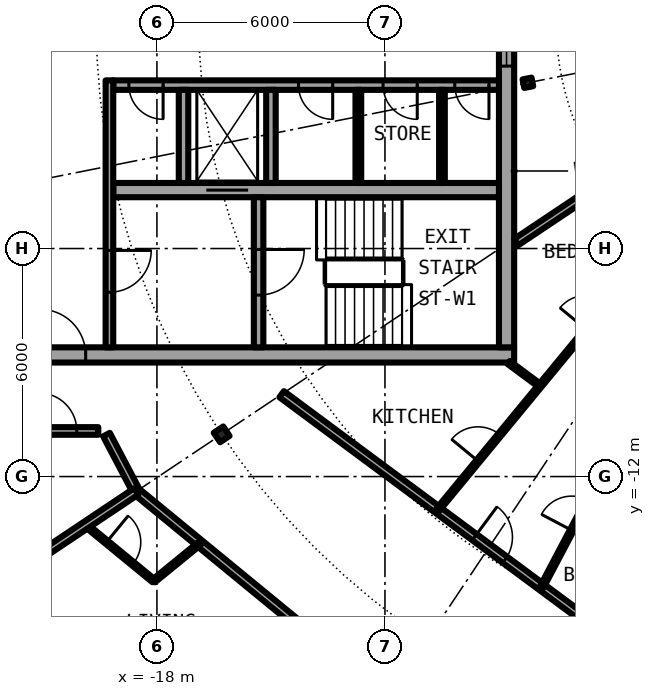
"""IFC4 building model, lengths in metres.
Left out: names, types, materials, properties, quantities, classifications, styles, units other than length and angle.
Written with IfcOpenShell. Run it as: python <this file> out.ifc"""

import sys

from ifc_helpers import new_model, si_unit, direction, frame, frame_2d, origin, origin_2d, place, context, subcontext, project, spatial, rectangle, i_section, extrude, element, fill, save


model = new_model("IFC4")
c1 = context("Model", 3, precision=1e-05, world=origin(), true_north=direction((0.0, 1.0)))
c2 = subcontext(c1, "Body", "Model", "MODEL_VIEW")
j1 = project(units=[si_unit("LENGTHUNIT", "METRE"), si_unit("PLANEANGLEUNIT", "RADIAN")], contexts=[c1])
p1 = place(None, origin())
s1 = spatial("IfcSite", under=j1, at=p1, CompositionType="ELEMENT")
p2 = place(p1, origin())
s2 = spatial("IfcBuilding", under=s1, at=p2, CompositionType="ELEMENT")
p3 = place(p2, frame((0.0, 0.0, 227.95)))
s3 = spatial("IfcBuildingStorey", under=s2, at=p3, CompositionType="ELEMENT", Elevation=227.95)
p4 = place(p3, frame((-16.297, -10.889, 0.0), z_axis=(0.0, 0.0, 1.0), x_axis=(-0.831469612303, -0.55557023302, 0.0)))
e1 = element("IfcColumn", 1, at=p4, inside=s3, PredefinedType="COLUMN", context=c2, shape_type="SweptSolid", body=[
    extrude(i_section(OverallWidth=0.3, OverallDepth=0.3, WebThickness=0.011, FlangeThickness=0.019, FilletRadius=0.027, at=origin_2d()), origin(), (0.0, 0.0, 1.0), 3.05),
])
p5 = place(p3, frame((-8.239, -1.639, 0.0), z_axis=(0.0, 0.0, 1.0), x_axis=(-0.980785280403, -0.195090322016, 0.0)))
e2 = element("IfcColumn", 2, at=p5, inside=s3, PredefinedType="COLUMN", context=c2, shape_type="SweptSolid", body=[
    extrude(i_section(OverallWidth=0.24, OverallDepth=0.23, WebThickness=0.008, FlangeThickness=0.012, FilletRadius=0.021, at=origin_2d()), origin(), (0.0, 0.0, 1.0), 3.05),
])
p6 = place(p3, frame((-22.699, -15.167, 0.0), z_axis=(0.0, 0.0, 1.0), x_axis=(0.634382322723, -0.773019449054, 0.0)))
e3 = element("IfcWall", 3, at=p6, inside=s3, PredefinedType="SOLIDWALL", context=c2, shape_type="SweptSolid", body=[
    extrude(rectangle(XDim=5.352, YDim=0.25, at=frame_2d((2.676, 0.0))), origin(), (0.0, 0.0, 1.0), 2.7),
])
p7 = place(p6, frame((0.841, 0.0, 0.0)))
e4 = element("IfcOpeningElement", 4, at=p7, cuts=e3, PredefinedType="OPENING", context=c2, shape_type="SweptSolid", body=[
    extrude(rectangle(XDim=1.0, YDim=2.2, at=frame_2d((0.5, 1.1))), frame((0.0, 0.135, 0.0), z_axis=(0.0, -1.0, 0.0), x_axis=(1.0, 0.0, 0.0)), (0.0, 0.0, 1.0), 0.27),
])
p8 = place(p6, frame((3.111, 0.0, 0.3)))
e5 = element("IfcOpeningElement", 5, at=p8, cuts=e3, PredefinedType="OPENING", context=c2, shape_type="SweptSolid", body=[
    extrude(rectangle(XDim=1.8, YDim=2.1, at=frame_2d((0.9, 1.05))), frame((0.0, 0.135, 0.0), z_axis=(0.0, -1.0, 0.0), x_axis=(1.0, 0.0, 0.0)), (0.0, 0.0, 1.0), 0.27),
])
p9 = place(p3, frame((-22.0, -8.8, 0.0), z_axis=(0.0, 0.0, 1.0), x_axis=(1.0, 0.0, 0.0)))
e6 = element("IfcWall", 6, at=p9, inside=s3, PredefinedType="SHEAR", context=c2, shape_type="SweptSolid", body=[
    extrude(rectangle(XDim=13.4, YDim=0.4, at=frame_2d((6.7, 0.0))), origin(), (0.0, 0.0, 1.0), 3.05),
])
p10 = place(p9, frame((0.925, 0.0, 0.0)))
e7 = element("IfcOpeningElement", 7, at=p10, cuts=e6, PredefinedType="OPENING", context=c2, shape_type="SweptSolid", body=[
    extrude(rectangle(XDim=1.2, YDim=2.3, at=frame_2d((0.6, 1.15))), frame((0.0, 0.21, 0.0), z_axis=(0.0, -1.0, 0.0), x_axis=(1.0, 0.0, 0.0)), (0.0, 0.0, 1.0), 0.42),
])
p11 = place(p3, frame((-8.8, 8.6, 0.0), z_axis=(0.0, 0.0, 1.0), x_axis=(0.0, -1.0, 0.0)))
e8 = element("IfcWall", 8, at=p11, inside=s3, PredefinedType="SHEAR", context=c2, shape_type="SweptSolid", body=[
    extrude(rectangle(XDim=17.2, YDim=0.4, at=frame_2d((8.6, 0.0))), origin(), (0.0, 0.0, 1.0), 3.05),
])
p12 = place(p11, frame((7.4, 0.0, 0.1)))
e9 = element("IfcOpeningElement", 9, at=p12, cuts=e8, PredefinedType="OPENING", context=c2, shape_type="SweptSolid", body=[
    extrude(rectangle(XDim=2.4, YDim=2.2, at=frame_2d((1.2, 1.1))), frame((0.0, 0.21, 0.0), z_axis=(0.0, -1.0, 0.0), x_axis=(1.0, 0.0, 0.0)), (0.0, 0.0, 1.0), 0.42),
])
p13 = place(p3, frame((-9.0, -1.7, 0.0), z_axis=(0.0, 0.0, 1.0), x_axis=(-1.0, 0.0, 0.0)))
e10 = element("IfcWall", 10, at=p13, inside=s3, PredefinedType="SHEAR", context=c2, shape_type="SweptSolid", body=[
    extrude(rectangle(XDim=10.15, YDim=0.25, at=frame_2d((5.075, 0.0))), origin(), (0.0, 0.0, 1.0), 3.05),
])
p14 = place(p13, frame((0.262, 0.0, 0.0)))
e11 = element("IfcOpeningElement", 11, at=p14, cuts=e10, PredefinedType="OPENING", context=c2, shape_type="SweptSolid", body=[
    extrude(rectangle(XDim=0.9, YDim=2.3, at=frame_2d((0.45, 1.15))), frame((0.0, 0.135, 0.0), z_axis=(0.0, -1.0, 0.0), x_axis=(1.0, 0.0, 0.0)), (0.0, 0.0, 1.0), 0.27),
])
p15 = place(p13, frame((2.15, 0.0, 0.0)))
e12 = element("IfcOpeningElement", 12, at=p15, cuts=e10, PredefinedType="OPENING", context=c2, shape_type="SweptSolid", body=[
    extrude(rectangle(XDim=0.9, YDim=2.3, at=frame_2d((0.45, 1.15))), frame((0.0, 0.135, 0.0), z_axis=(0.0, -1.0, 0.0), x_axis=(1.0, 0.0, 0.0)), (0.0, 0.0, 1.0), 0.27),
])
p16 = place(p13, frame((4.375, 0.0, 0.0)))
e13 = element("IfcOpeningElement", 13, at=p16, cuts=e10, PredefinedType="OPENING", context=c2, shape_type="SweptSolid", body=[
    extrude(rectangle(XDim=0.9, YDim=2.3, at=frame_2d((0.45, 1.15))), frame((0.0, 0.135, 0.0), z_axis=(0.0, -1.0, 0.0), x_axis=(1.0, 0.0, 0.0)), (0.0, 0.0, 1.0), 0.27),
])
p17 = place(p13, frame((8.837, 0.0, 0.0)))
e14 = element("IfcOpeningElement", 14, at=p17, cuts=e10, PredefinedType="OPENING", context=c2, shape_type="SweptSolid", body=[
    extrude(rectangle(XDim=0.9, YDim=2.3, at=frame_2d((0.45, 1.15))), frame((0.0, 0.135, 0.0), z_axis=(0.0, -1.0, 0.0), x_axis=(1.0, 0.0, 0.0)), (0.0, 0.0, 1.0), 0.27),
])
p18 = place(p3, frame((-9.0, -4.462, 0.0), z_axis=(0.0, 0.0, 1.0), x_axis=(-1.0, 0.0, 0.0)))
e15 = element("IfcWall", 15, at=p18, inside=s3, PredefinedType="SHEAR", context=c2, shape_type="SweptSolid", body=[
    extrude(rectangle(XDim=10.15, YDim=0.375, at=frame_2d((5.075, 0.0))), origin(), (0.0, 0.0, 1.0), 3.05),
])
p19 = place(p18, frame((6.6, 0.0, 0.0)))
e16 = element("IfcOpeningElement", 16, at=p19, cuts=e15, PredefinedType="OPENING", context=c2, shape_type="SweptSolid", body=[
    extrude(rectangle(XDim=1.1, YDim=2.3, at=frame_2d((0.55, 1.15))), frame((0.0, 0.198, 0.0), z_axis=(0.0, -1.0, 0.0), x_axis=(1.0, 0.0, 0.0)), (0.0, 0.0, 1.0), 0.395),
])
p20 = place(p3, frame((-15.325, -4.65, 0.0), z_axis=(0.0, 0.0, 1.0), x_axis=(0.0, -1.0, 0.0)))
e17 = element("IfcWall", 17, at=p20, inside=s3, PredefinedType="SHEAR", context=c2, shape_type="SweptSolid", body=[
    extrude(rectangle(XDim=3.95, YDim=0.25, at=frame_2d((1.975, 0.0))), origin(), (0.0, 0.0, 1.0), 3.05),
])
p21 = place(p20, frame((1.375, 0.0, 0.0)))
e18 = element("IfcOpeningElement", 18, at=p21, cuts=e17, PredefinedType="OPENING", context=c2, shape_type="SweptSolid", body=[
    extrude(rectangle(XDim=1.2, YDim=2.3, at=frame_2d((0.6, 1.15))), frame((0.0, 0.135, 0.0), z_axis=(0.0, -1.0, 0.0), x_axis=(1.0, 0.0, 0.0)), (0.0, 0.0, 1.0), 0.27),
])
for number, where, z_axis, x_axis in (
    (19, (-15.0, -1.825, 0.0), (0.0, 0.0, 1.0), (0.0, -1.0, 0.0)),
    (20, (-17.3, -1.825, 0.0), (0.0, 0.0, 1.0), (0.0, -1.0, 0.0)),
):
    element("IfcWall", number, at=place(p3, frame(where, z_axis=z_axis, x_axis=x_axis)), inside=s3, PredefinedType="SOLIDWALL", context=c2, shape_type="SweptSolid", body=[
        extrude(rectangle(XDim=2.45, YDim=0.25, at=frame_2d((1.225, 0.0))), origin(), (0.0, 0.0, 1.0), 2.7),
    ])
p22 = place(p3, frame((-19.25, -1.575, 0.0), z_axis=(0.0, 0.0, 1.0), x_axis=(0.0, -1.0, 0.0)))
e21 = element("IfcWall", 21, at=p22, inside=s3, PredefinedType="SOLIDWALL", context=c2, shape_type="SweptSolid", body=[
    extrude(rectangle(XDim=7.025, YDim=0.2, at=frame_2d((3.513, 0.0))), origin(), (0.0, 0.0, 1.0), 2.7),
])
p23 = place(p22, frame((4.475, 0.0, 0.0)))
e22 = element("IfcOpeningElement", 22, at=p23, cuts=e21, PredefinedType="OPENING", context=c2, shape_type="SweptSolid", body=[
    extrude(rectangle(XDim=1.1, YDim=2.3, at=frame_2d((0.55, 1.15))), frame((0.0, 0.11, 0.0), z_axis=(0.0, -1.0, 0.0), x_axis=(1.0, 0.0, 0.0)), (0.0, 0.0, 1.0), 0.22),
])
for number, where, z_axis, x_axis in (
    (23, (-10.5, -1.825, 0.0), (0.0, 0.0, 1.0), (0.0, -1.0, 0.0)),
    (24, (-12.7, -1.825, 0.0), (0.0, 0.0, 1.0), (0.0, -1.0, 0.0)),
):
    element("IfcWall", number, at=place(p3, frame(where, z_axis=z_axis, x_axis=x_axis)), inside=s3, PredefinedType="PARTITIONING", context=c2, shape_type="SweptSolid", body=[
        extrude(rectangle(XDim=2.45, YDim=0.15, at=frame_2d((1.225, 0.0))), origin(), (0.0, 0.0, 1.0), 2.7),
    ])
p24 = place(p3, frame((-19.875, -13.274, 0.0), z_axis=(0.0, 0.0, 1.0), x_axis=(0.77288890179, -0.634541366256, 0.0)))
e25 = element("IfcWall", 25, at=p24, inside=s3, PredefinedType="PARTITIONING", context=c2, shape_type="SweptSolid", body=[
    extrude(rectangle(XDim=2.313, YDim=0.1, at=frame_2d((1.157, 0.0))), origin(), (0.0, 0.0, 1.0), 2.7),
])
p25 = place(p24, frame((0.711, 0.0, 0.0)))
e26 = element("IfcOpeningElement", 26, at=p25, cuts=e25, PredefinedType="OPENING", context=c2, shape_type="SweptSolid", body=[
    extrude(rectangle(XDim=0.9, YDim=2.3, at=frame_2d((0.45, 1.15))), frame((0.0, 0.06, 0.0), z_axis=(0.0, -1.0, 0.0), x_axis=(1.0, 0.0, 0.0)), (0.0, 0.0, 1.0), 0.12),
])
p26 = place(p3, frame((-19.328, -10.896, 0.0), z_axis=(0.0, 0.0, 1.0), x_axis=(0.465812036273, -0.88488369115, 0.0)))
e27 = element("IfcWall", 27, at=p26, inside=s3, PredefinedType="PARTITIONING", context=c2, shape_type="SweptSolid", body=[
    extrude(rectangle(XDim=1.687, YDim=0.2, at=frame_2d((0.844, 0.0))), origin(), (0.0, 0.0, 1.0), 2.7),
])
p27 = place(p3, frame((-18.542, -12.389, 0.0), z_axis=(0.0, 0.0, 1.0), x_axis=(0.772983503654, -0.634426121056, 0.0)))
e28 = element("IfcWall", 28, at=p27, inside=s3, PredefinedType="PARTITIONING", context=c2, shape_type="SweptSolid", body=[
    extrude(rectangle(XDim=12.947, YDim=0.2, at=frame_2d((6.474, 0.0))), origin(), (0.0, 0.0, 1.0), 2.7),
])
p28 = place(p27, frame((7.053, 0.0, 0.0)))
e29 = element("IfcOpeningElement", 29, at=p28, cuts=e28, PredefinedType="OPENING", context=c2, shape_type="SweptSolid", body=[
    extrude(rectangle(XDim=1.0, YDim=2.3, at=frame_2d((0.5, 1.15))), frame((0.0, 0.11, 0.0), z_axis=(0.0, -1.0, 0.0), x_axis=(1.0, 0.0, 0.0)), (0.0, 0.0, 1.0), 0.22),
])
p29 = place(p3, frame((-14.718, -9.833, 0.0), z_axis=(0.0, 0.0, 1.0), x_axis=(0.803240181354, -0.595655278712, 0.0)))
e30 = element("IfcWall", 30, at=p29, inside=s3, PredefinedType="PARTITIONING", context=c2, shape_type="SweptSolid", body=[
    extrude(rectangle(XDim=11.928, YDim=0.2, at=frame_2d((5.964, 0.0))), origin(), (0.0, 0.0, 1.0), 2.7),
])
p30 = place(p29, frame((6.316, 0.0, 0.0)))
e31 = element("IfcOpeningElement", 31, at=p30, cuts=e30, PredefinedType="OPENING", context=c2, shape_type="SweptSolid", body=[
    extrude(rectangle(XDim=1.0, YDim=2.3, at=frame_2d((0.5, 1.15))), frame((0.0, 0.11, 0.0), z_axis=(0.0, -1.0, 0.0), x_axis=(1.0, 0.0, 0.0)), (0.0, 0.0, 1.0), 0.22),
])
p31 = place(p3, frame((-8.743, -9.0, 0.0), z_axis=(0.0, 0.0, 1.0), x_axis=(0.80321556998, -0.595688465677, 0.0)))
e32 = element("IfcWall", 32, at=p31, inside=s3, PredefinedType="PARTITIONING", context=c2, shape_type="SweptSolid", body=[
    extrude(rectangle(XDim=1.026, YDim=0.1, at=frame_2d((0.513, 0.0))), origin(), (0.0, 0.0, 1.0), 2.7),
])
p32 = place(p3, frame((-21.675, -10.8, 0.0), z_axis=(0.0, 0.0, 1.0), x_axis=(1.0, 0.0, 0.0)))
e33 = element("IfcWall", 33, at=p32, inside=s3, PredefinedType="PARTITIONING", context=c2, shape_type="SweptSolid", body=[
    extrude(rectangle(XDim=2.132, YDim=0.2, at=frame_2d((1.066, 0.0))), origin(), (0.0, 0.0, 1.0), 2.7),
])
p33 = place(p32, frame((0.566, 0.0, 0.0)))
e34 = element("IfcOpeningElement", 34, at=p33, cuts=e33, PredefinedType="OPENING", context=c2, shape_type="SweptSolid", body=[
    extrude(rectangle(XDim=1.0, YDim=2.3, at=frame_2d((0.5, 1.15))), frame((0.0, 0.11, 0.0), z_axis=(0.0, -1.0, 0.0), x_axis=(1.0, 0.0, 0.0)), (0.0, 0.0, 1.0), 0.22),
])
p34 = place(p3, frame((-6.513, -4.472, 0.0), z_axis=(0.0, 0.0, 1.0), x_axis=(-0.831450132577, -0.555599385382, 0.0)))
e35 = element("IfcWall", 35, at=p34, inside=s3, PredefinedType="PARTITIONING", context=c2, shape_type="SweptSolid", body=[
    extrude(rectangle(XDim=2.443, YDim=0.2, at=frame_2d((1.221, 0.0))), origin(), (0.0, 0.0, 1.0), 2.7),
])
p35 = place(p3, frame((-22.595, -15.098, 0.0), z_axis=(0.0, 0.0, 1.0), x_axis=(0.831387096605, 0.55569370664, 0.0)))
e36 = element("IfcWall", 36, at=p35, inside=s3, PredefinedType="PARTITIONING", context=c2, shape_type="SweptSolid", body=[
    extrude(rectangle(XDim=4.875, YDim=0.2, at=frame_2d((2.438, 0.0))), origin(), (0.0, 0.0, 1.0), 2.7),
])
p36 = place(p3, frame((-18.084, -14.745, 0.0), z_axis=(0.0, 0.0, 1.0), x_axis=(0.774869051393, 0.632121786679, 0.0)))
e37 = element("IfcWall", 37, at=p36, inside=s3, PredefinedType="PARTITIONING", context=c2, shape_type="SweptSolid", body=[
    extrude(rectangle(XDim=1.562, YDim=0.1, at=frame_2d((0.781, 0.0))), origin(), (0.0, 0.0, 1.0), 2.7),
])
p37 = place(p3, frame((-10.612, -12.878, 0.0), z_axis=(0.0, 0.0, 1.0), x_axis=(0.636115614725, 0.771593756262, 0.0)))
e38 = element("IfcWall", 38, at=p37, inside=s3, PredefinedType="PARTITIONING", context=c2, shape_type="SweptSolid", body=[
    extrude(rectangle(XDim=8.967, YDim=0.1, at=frame_2d((4.483, 0.0))), origin(), (0.0, 0.0, 1.0), 2.7),
])
p38 = place(p37, frame((1.667, 0.0, 0.0)))
e39 = element("IfcOpeningElement", 39, at=p38, cuts=e38, PredefinedType="OPENING", context=c2, shape_type="SweptSolid", body=[
    extrude(rectangle(XDim=0.9, YDim=2.3, at=frame_2d((0.45, 1.15))), frame((0.0, 0.06, 0.0), z_axis=(0.0, -1.0, 0.0), x_axis=(1.0, 0.0, 0.0)), (0.0, 0.0, 1.0), 0.12),
])
p39 = place(p37, frame((6.151, 0.0, 0.0)))
e40 = element("IfcOpeningElement", 40, at=p39, cuts=e38, PredefinedType="OPENING", context=c2, shape_type="SweptSolid", body=[
    extrude(rectangle(XDim=0.9, YDim=2.3, at=frame_2d((0.45, 1.15))), frame((0.0, 0.06, 0.0), z_axis=(0.0, -1.0, 0.0), x_axis=(1.0, 0.0, 0.0)), (0.0, 0.0, 1.0), 0.12),
])
p40 = place(p3, frame((-7.874, -14.909, 0.0), z_axis=(0.0, 0.0, 1.0), x_axis=(0.467030118529, 0.884241408432, 0.0)))
e41 = element("IfcWall", 41, at=p40, inside=s3, PredefinedType="PARTITIONING", context=c2, shape_type="SweptSolid", body=[
    extrude(rectangle(XDim=4.278, YDim=0.1, at=frame_2d((2.139, 0.0))), origin(), (0.0, 0.0, 1.0), 2.7),
])
p41 = place(p40, frame((1.69, 0.0, 0.0)))
e42 = element("IfcOpeningElement", 42, at=p41, cuts=e41, PredefinedType="OPENING", context=c2, shape_type="SweptSolid", body=[
    extrude(rectangle(XDim=0.9, YDim=2.3, at=frame_2d((0.45, 1.15))), frame((0.0, 0.06, 0.0), z_axis=(0.0, -1.0, 0.0), x_axis=(1.0, 0.0, 0.0)), (0.0, 0.0, 1.0), 0.12),
])
p42 = place(p19, origin())
e43 = element("IfcDoor", 43, at=p42, inside=s3, OperationType="DOUBLE_DOOR_SLIDING", PredefinedType="DOOR", context=c2, shape_type="SweptSolid", body=[
    extrude(rectangle(XDim=1.1, YDim=2.3, at=frame_2d((0.55, 1.15))), frame((0.0, 0.025, 0.0), z_axis=(0.0, -1.0, 0.0), x_axis=(1.0, 0.0, 0.0)), (0.0, 0.0, 1.0), 0.05),
])
fill(e16, e43)
p43 = place(p14, origin())
e44 = element("IfcDoor", 44, at=p43, inside=s3, OperationType="SINGLE_SWING_RIGHT", PredefinedType="DOOR", context=c2, shape_type="SweptSolid", body=[
    extrude(rectangle(XDim=0.9, YDim=2.3, at=frame_2d((0.45, 1.15))), frame((0.0, 0.025, 0.0), z_axis=(0.0, -1.0, 0.0), x_axis=(1.0, 0.0, 0.0)), (0.0, 0.0, 1.0), 0.05),
])
fill(e11, e44)
p44 = place(p15, origin())
e45 = element("IfcDoor", 45, at=p44, inside=s3, OperationType="SINGLE_SWING_RIGHT", PredefinedType="DOOR", context=c2, shape_type="SweptSolid", body=[
    extrude(rectangle(XDim=0.9, YDim=2.3, at=frame_2d((0.45, 1.15))), frame((0.0, 0.025, 0.0), z_axis=(0.0, -1.0, 0.0), x_axis=(1.0, 0.0, 0.0)), (0.0, 0.0, 1.0), 0.05),
])
fill(e12, e45)
p45 = place(p16, origin())
e46 = element("IfcDoor", 46, at=p45, inside=s3, OperationType="SINGLE_SWING_RIGHT", PredefinedType="DOOR", context=c2, shape_type="SweptSolid", body=[
    extrude(rectangle(XDim=0.9, YDim=2.3, at=frame_2d((0.45, 1.15))), frame((0.0, 0.025, 0.0), z_axis=(0.0, -1.0, 0.0), x_axis=(1.0, 0.0, 0.0)), (0.0, 0.0, 1.0), 0.05),
])
fill(e13, e46)
p46 = place(p17, origin())
e47 = element("IfcDoor", 47, at=p46, inside=s3, OperationType="SINGLE_SWING_LEFT", PredefinedType="DOOR", context=c2, shape_type="SweptSolid", body=[
    extrude(rectangle(XDim=0.9, YDim=2.3, at=frame_2d((0.45, 1.15))), frame((0.0, 0.025, 0.0), z_axis=(0.0, -1.0, 0.0), x_axis=(1.0, 0.0, 0.0)), (0.0, 0.0, 1.0), 0.05),
])
fill(e14, e47)
p47 = place(p21, origin())
e48 = element("IfcDoor", 48, at=p47, inside=s3, OperationType="SINGLE_SWING_LEFT", PredefinedType="DOOR", context=c2, shape_type="SweptSolid", body=[
    extrude(rectangle(XDim=1.2, YDim=2.3, at=frame_2d((0.6, 1.15))), frame((0.0, 0.025, 0.0), z_axis=(0.0, -1.0, 0.0), x_axis=(1.0, 0.0, 0.0)), (0.0, 0.0, 1.0), 0.05),
])
fill(e18, e48)
p48 = place(p23, origin())
e49 = element("IfcDoor", 49, at=p48, inside=s3, OperationType="SINGLE_SWING_LEFT", PredefinedType="DOOR", context=c2, shape_type="SweptSolid", body=[
    extrude(rectangle(XDim=1.1, YDim=2.3, at=frame_2d((0.55, 1.15))), frame((0.0, 0.025, 0.0), z_axis=(0.0, -1.0, 0.0), x_axis=(1.0, 0.0, 0.0)), (0.0, 0.0, 1.0), 0.05),
])
fill(e22, e49)
p49 = place(p10, origin())
e50 = element("IfcDoor", 50, at=p49, inside=s3, OperationType="SINGLE_SWING_RIGHT", PredefinedType="DOOR", context=c2, shape_type="SweptSolid", body=[
    extrude(rectangle(XDim=1.2, YDim=2.3, at=frame_2d((0.6, 1.15))), frame((0.0, 0.025, 0.0), z_axis=(0.0, -1.0, 0.0), x_axis=(1.0, 0.0, 0.0)), (0.0, 0.0, 1.0), 0.05),
])
fill(e7, e50)
p50 = place(p12, origin())
e51 = element("IfcWindow", 51, at=p50, inside=s3, PartitioningType="SINGLE_PANEL", PredefinedType="WINDOW", context=c2, shape_type="SweptSolid", body=[
    extrude(rectangle(XDim=2.4, YDim=2.2, at=frame_2d((1.2, 1.1))), frame((0.0, 0.03, 0.0), z_axis=(0.0, -1.0, 0.0), x_axis=(1.0, 0.0, 0.0)), (0.0, 0.0, 1.0), 0.06),
])
fill(e9, e51)
p51 = place(p25, origin())
e52 = element("IfcDoor", 52, at=p51, inside=s3, OperationType="SINGLE_SWING_RIGHT", PredefinedType="DOOR", context=c2, shape_type="SweptSolid", body=[
    extrude(rectangle(XDim=0.9, YDim=2.3, at=frame_2d((0.45, 1.15))), frame((0.0, 0.025, 0.0), z_axis=(0.0, -1.0, 0.0), x_axis=(1.0, 0.0, 0.0)), (0.0, 0.0, 1.0), 0.05),
])
fill(e26, e52)
p52 = place(p30, origin())
e53 = element("IfcDoor", 53, at=p52, inside=s3, OperationType="SINGLE_SWING_RIGHT", PredefinedType="DOOR", context=c2, shape_type="SweptSolid", body=[
    extrude(rectangle(XDim=1.0, YDim=2.3, at=frame_2d((0.5, 1.15))), frame((0.0, 0.025, 0.0), z_axis=(0.0, -1.0, 0.0), x_axis=(1.0, 0.0, 0.0)), (0.0, 0.0, 1.0), 0.05),
])
fill(e31, e53)
p53 = place(p41, origin())
e54 = element("IfcDoor", 54, at=p53, inside=s3, OperationType="SINGLE_SWING_RIGHT", PredefinedType="DOOR", context=c2, shape_type="SweptSolid", body=[
    extrude(rectangle(XDim=0.9, YDim=2.3, at=frame_2d((0.45, 1.15))), frame((0.0, 0.025, 0.0), z_axis=(0.0, -1.0, 0.0), x_axis=(1.0, 0.0, 0.0)), (0.0, 0.0, 1.0), 0.05),
])
fill(e42, e54)
p54 = place(p38, origin())
e55 = element("IfcDoor", 55, at=p54, inside=s3, OperationType="SINGLE_SWING_LEFT", PredefinedType="DOOR", context=c2, shape_type="SweptSolid", body=[
    extrude(rectangle(XDim=0.9, YDim=2.3, at=frame_2d((0.45, 1.15))), frame((0.0, 0.025, 0.0), z_axis=(0.0, -1.0, 0.0), x_axis=(1.0, 0.0, 0.0)), (0.0, 0.0, 1.0), 0.05),
])
fill(e39, e55)
p55 = place(p33, origin())
e56 = element("IfcDoor", 56, at=p55, inside=s3, OperationType="SINGLE_SWING_LEFT", PredefinedType="DOOR", context=c2, shape_type="SweptSolid", body=[
    extrude(rectangle(XDim=1.0, YDim=2.3, at=frame_2d((0.5, 1.15))), frame((0.0, 0.025, 0.0), z_axis=(0.0, -1.0, 0.0), x_axis=(1.0, 0.0, 0.0)), (0.0, 0.0, 1.0), 0.05),
])
fill(e34, e56)
save(model, sys.argv[1])
